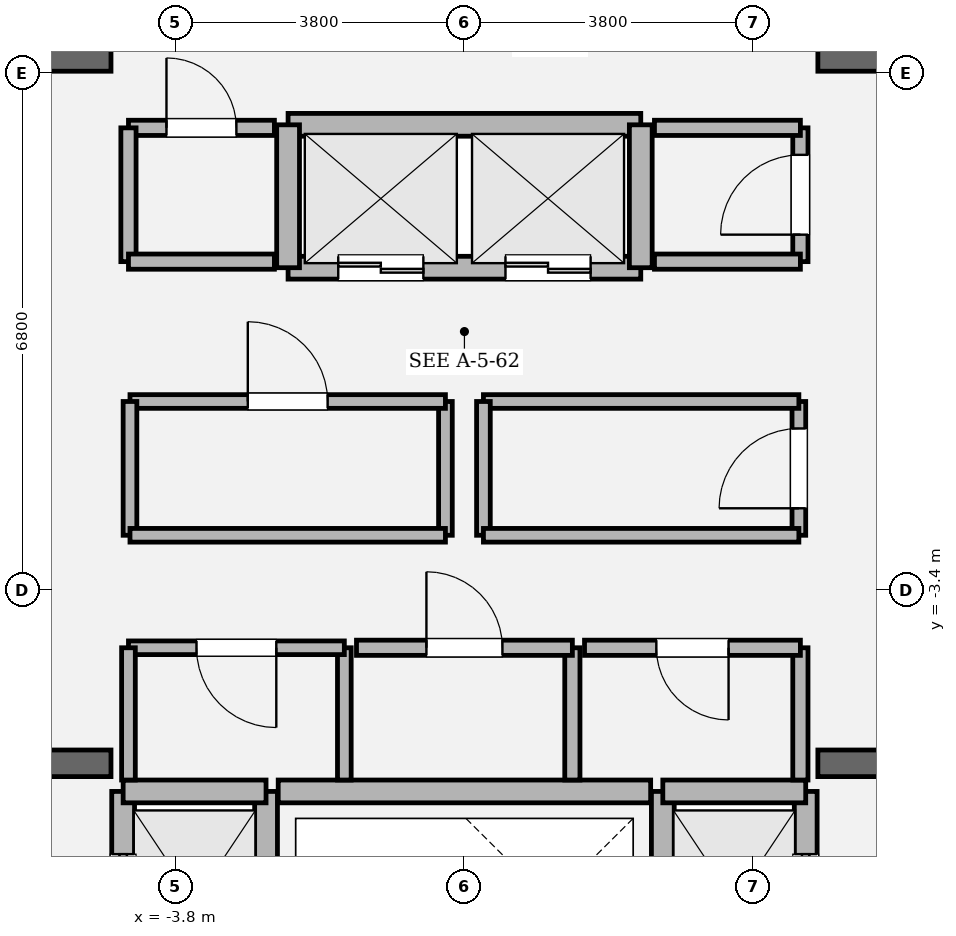
"""IFC4 building model, lengths in metres.
Left out: names, types, materials, properties, quantities, classifications, styles, units other than length and angle.
Written with IfcOpenShell. Run it as: python <this file> out.ifc"""

import sys

from ifc_helpers import new_model, si_unit, direction, frame, frame_2d, origin, place, context, subcontext, project, spatial, rectangle, extrude, element, fill, save


model = new_model("IFC4")
c1 = context("Model", 3, precision=1e-05, world=origin(), true_north=direction((0.0, 1.0)))
c2 = subcontext(c1, "Body", "Model", "MODEL_VIEW")
j1 = project(units=[si_unit("LENGTHUNIT", "METRE"), si_unit("PLANEANGLEUNIT", "RADIAN")], contexts=[c1])
p1 = place(None, origin())
s1 = spatial("IfcSite", under=j1, at=p1, CompositionType="ELEMENT")
p2 = place(p1, origin())
s2 = spatial("IfcBuilding", under=s1, at=p2, CompositionType="ELEMENT")
p3 = place(p2, frame((0.0, 0.0, 300.6)))
s3 = spatial("IfcBuildingStorey", under=s2, at=p3, CompositionType="ELEMENT", Elevation=300.6)
p4 = place(p3, frame((-9.925, -5.68, 0.0), z_axis=(0.0, 0.0, 1.0), x_axis=(1.0, 0.0, 0.0)))
e1 = element("IfcWall", 1, at=p4, inside=s3, PredefinedType="SOLIDWALL", context=c2, shape_type="SweptSolid", body=[
    extrude(rectangle(XDim=5.275, YDim=0.35, at=frame_2d((2.638, 0.0))), origin(), (0.0, 0.0, 1.0), 4.2),
])
p5 = place(p4, frame((1.385, 0.0, 0.0)))
e2 = element("IfcOpeningElement", 2, at=p5, cuts=e1, PredefinedType="OPENING", context=c2, shape_type="SweptSolid", body=[
    extrude(rectangle(XDim=1.18, YDim=2.2, at=frame_2d((0.59, 1.1))), frame((0.0, 0.185, 0.0), z_axis=(0.0, -1.0, 0.0), x_axis=(1.0, 0.0, 0.0)), (0.0, 0.0, 1.0), 0.37),
])
p6 = place(p3, frame((4.65, -5.68, 0.0), z_axis=(0.0, 0.0, 1.0), x_axis=(1.0, 0.0, 0.0)))
e3 = element("IfcWall", 3, at=p6, inside=s3, PredefinedType="SOLIDWALL", context=c2, shape_type="SweptSolid", body=[
    extrude(rectangle(XDim=5.275, YDim=0.35, at=frame_2d((2.638, 0.0))), origin(), (0.0, 0.0, 1.0), 4.2),
])
p7 = place(p6, frame((2.71, 0.0, 0.0)))
e4 = element("IfcOpeningElement", 4, at=p7, cuts=e3, PredefinedType="OPENING", context=c2, shape_type="SweptSolid", body=[
    extrude(rectangle(XDim=1.18, YDim=2.2, at=frame_2d((0.59, 1.1))), frame((0.0, 0.185, 0.0), z_axis=(0.0, -1.0, 0.0), x_axis=(1.0, 0.0, 0.0)), (0.0, 0.0, 1.0), 0.37),
])
for number, where, z_axis, x_axis in (
    (5, (-9.925, 3.6, 0.0), (0.0, 0.0, 1.0), (1.0, 0.0, 0.0)),
    (6, (4.65, 3.6, 0.0), (0.0, 0.0, 1.0), (1.0, 0.0, 0.0)),
):
    element("IfcWall", number, at=place(p3, frame(where, z_axis=z_axis, x_axis=x_axis)), inside=s3, PredefinedType="SOLIDWALL", context=c2, shape_type="SweptSolid", body=[
        extrude(rectangle(XDim=5.275, YDim=0.35, at=frame_2d((2.638, 0.0))), origin(), (0.0, 0.0, 1.0), 4.2),
    ])
p8 = place(p3, frame((-4.49, -8.82, 0.0), z_axis=(0.0, 0.0, 1.0), x_axis=(0.0, 1.0, 0.0)))
e7 = element("IfcWall", 7, at=p8, inside=s3, PredefinedType="SOLIDWALL", context=c2, shape_type="SweptSolid", body=[
    extrude(rectangle(XDim=2.77, YDim=0.3, at=frame_2d((1.385, 0.0))), origin(), (0.0, 0.0, 1.0), 4.0),
])
p9 = place(p8, frame((0.825, 0.0, 0.0)))
e8 = element("IfcOpeningElement", 8, at=p9, cuts=e7, PredefinedType="OPENING", context=c2, shape_type="SweptSolid", body=[
    extrude(rectangle(XDim=1.12, YDim=2.25, at=frame_2d((0.56, 1.125))), frame((0.0, 0.16, 0.0), z_axis=(0.0, -1.0, 0.0), x_axis=(1.0, 0.0, 0.0)), (0.0, 0.0, 1.0), 0.32),
])
p10 = place(p3, frame((-2.61, -8.82, 0.0), z_axis=(0.0, 0.0, 1.0), x_axis=(0.0, 1.0, 0.0)))
e9 = element("IfcWall", 9, at=p10, inside=s3, PredefinedType="SOLIDWALL", context=c2, shape_type="SweptSolid", body=[
    extrude(rectangle(XDim=2.77, YDim=0.3, at=frame_2d((1.385, 0.0))), origin(), (0.0, 0.0, 1.0), 4.0),
])
p11 = place(p3, frame((-4.49, -6.05, 0.0), z_axis=(0.0, 0.0, 1.0), x_axis=(1.0, 0.0, 0.0)))
e10 = element("IfcWall", 10, at=p11, inside=s3, PredefinedType="SOLIDWALL", context=c2, shape_type="SweptSolid", body=[
    extrude(rectangle(XDim=1.88, YDim=0.3, at=frame_2d((0.94, 0.0))), origin(), (0.0, 0.0, 1.0), 4.0),
])
p12 = place(p3, frame((4.49, -8.82, 0.0), z_axis=(0.0, 0.0, 1.0), x_axis=(0.0, 1.0, 0.0)))
e11 = element("IfcWall", 11, at=p12, inside=s3, PredefinedType="SOLIDWALL", context=c2, shape_type="SweptSolid", body=[
    extrude(rectangle(XDim=2.77, YDim=0.3, at=frame_2d((1.385, 0.0))), origin(), (0.0, 0.0, 1.0), 4.0),
])
p13 = place(p12, frame((0.825, 0.0, 0.0)))
e12 = element("IfcOpeningElement", 12, at=p13, cuts=e11, PredefinedType="OPENING", context=c2, shape_type="SweptSolid", body=[
    extrude(rectangle(XDim=1.12, YDim=2.25, at=frame_2d((0.56, 1.125))), frame((0.0, 0.16, 0.0), z_axis=(0.0, -1.0, 0.0), x_axis=(1.0, 0.0, 0.0)), (0.0, 0.0, 1.0), 0.32),
])
p14 = place(p3, frame((2.61, -8.82, 0.0), z_axis=(0.0, 0.0, 1.0), x_axis=(0.0, 1.0, 0.0)))
e13 = element("IfcWall", 13, at=p14, inside=s3, PredefinedType="SOLIDWALL", context=c2, shape_type="SweptSolid", body=[
    extrude(rectangle(XDim=2.77, YDim=0.3, at=frame_2d((1.385, 0.0))), origin(), (0.0, 0.0, 1.0), 4.0),
])
p15 = place(p3, frame((2.61, -6.05, 0.0), z_axis=(0.0, 0.0, 1.0), x_axis=(1.0, 0.0, 0.0)))
e14 = element("IfcWall", 14, at=p15, inside=s3, PredefinedType="SOLIDWALL", context=c2, shape_type="SweptSolid", body=[
    extrude(rectangle(XDim=1.88, YDim=0.3, at=frame_2d((0.94, 0.0))), origin(), (0.0, 0.0, 1.0), 4.0),
])
p16 = place(p3, frame((-2.32, 0.84, 0.0), z_axis=(0.0, 0.0, 1.0), x_axis=(1.0, 0.0, 0.0)))
e15 = element("IfcWall", 15, at=p16, inside=s3, PredefinedType="SOLIDWALL", context=c2, shape_type="SweptSolid", body=[
    extrude(rectangle(XDim=4.64, YDim=0.3, at=frame_2d((2.32, 0.0))), origin(), (0.0, 0.0, 1.0), 4.0),
])
p17 = place(p16, frame((0.66, 0.0, 0.0)))
e16 = element("IfcOpeningElement", 16, at=p17, cuts=e15, PredefinedType="OPENING", context=c2, shape_type="SweptSolid", body=[
    extrude(rectangle(XDim=1.12, YDim=2.25, at=frame_2d((0.56, 1.125))), frame((0.0, 0.16, 0.0), z_axis=(0.0, -1.0, 0.0), x_axis=(1.0, 0.0, 0.0)), (0.0, 0.0, 1.0), 0.32),
])
p18 = place(p16, frame((2.86, 0.0, 0.0)))
e17 = element("IfcOpeningElement", 17, at=p18, cuts=e15, PredefinedType="OPENING", context=c2, shape_type="SweptSolid", body=[
    extrude(rectangle(XDim=1.12, YDim=2.25, at=frame_2d((0.56, 1.125))), frame((0.0, 0.16, 0.0), z_axis=(0.0, -1.0, 0.0), x_axis=(1.0, 0.0, 0.0)), (0.0, 0.0, 1.0), 0.32),
])
p19 = place(p3, frame((-2.32, 2.72, 0.0), z_axis=(0.0, 0.0, 1.0), x_axis=(1.0, 0.0, 0.0)))
e18 = element("IfcWall", 18, at=p19, inside=s3, PredefinedType="SOLIDWALL", context=c2, shape_type="SweptSolid", body=[
    extrude(rectangle(XDim=4.64, YDim=0.3, at=frame_2d((2.32, 0.0))), origin(), (0.0, 0.0, 1.0), 4.0),
])
for number, where, z_axis, x_axis in (
    (19, (-2.32, 0.84, 0.0), (0.0, 0.0, 1.0), (0.0, 1.0, 0.0)),
    (20, (2.32, 0.84, 0.0), (0.0, 0.0, 1.0), (0.0, 1.0, 0.0)),
):
    element("IfcWall", number, at=place(p3, frame(where, z_axis=z_axis, x_axis=x_axis)), inside=s3, PredefinedType="SOLIDWALL", context=c2, shape_type="SweptSolid", body=[
        extrude(rectangle(XDim=1.88, YDim=0.3, at=frame_2d((0.94, 0.0))), origin(), (0.0, 0.0, 1.0), 4.0),
    ])
p20 = place(p3, frame((-2.45, -6.05, 0.0), z_axis=(0.0, 0.0, 1.0), x_axis=(1.0, 0.0, 0.0)))
e21 = element("IfcWall", 21, at=p20, inside=s3, PredefinedType="SOLIDWALL", context=c2, shape_type="SweptSolid", body=[
    extrude(rectangle(XDim=4.9, YDim=0.3, at=frame_2d((2.45, 0.0))), origin(), (0.0, 0.0, 1.0), 4.0),
])
p21 = place(p3, frame((-1.58, -5.9, 0.0), z_axis=(0.0, 0.0, 1.0), x_axis=(0.0, 1.0, 0.0)))
e22 = element("IfcWall", 22, at=p21, inside=s3, PredefinedType="PARTITIONING", context=c2, shape_type="SweptSolid", body=[
    extrude(rectangle(XDim=1.74, YDim=0.18, at=frame_2d((0.87, 0.0))), origin(), (0.0, 0.0, 1.0), 4.0),
])
p22 = place(p3, frame((-1.58, -4.16, 0.0), z_axis=(0.0, 0.0, 1.0), x_axis=(-1.0, 0.0, 0.0)))
e23 = element("IfcWall", 23, at=p22, inside=s3, PredefinedType="PARTITIONING", context=c2, shape_type="SweptSolid", body=[
    extrude(rectangle(XDim=2.84, YDim=0.18, at=frame_2d((1.42, 0.0))), origin(), (0.0, 0.0, 1.0), 4.0),
])
p23 = place(p22, frame((0.895, 0.0, 0.0)))
e24 = element("IfcOpeningElement", 24, at=p23, cuts=e23, PredefinedType="OPENING", context=c2, shape_type="SweptSolid", body=[
    extrude(rectangle(XDim=1.05, YDim=2.2, at=frame_2d((0.525, 1.1))), frame((0.0, 0.1, 0.0), z_axis=(0.0, -1.0, 0.0), x_axis=(1.0, 0.0, 0.0)), (0.0, 0.0, 1.0), 0.2),
])
p24 = place(p3, frame((-4.42, -4.16, 0.0), z_axis=(0.0, 0.0, 1.0), x_axis=(0.0, -1.0, 0.0)))
e25 = element("IfcWall", 25, at=p24, inside=s3, PredefinedType="PARTITIONING", context=c2, shape_type="SweptSolid", body=[
    extrude(rectangle(XDim=1.74, YDim=0.18, at=frame_2d((0.87, 0.0))), origin(), (0.0, 0.0, 1.0), 4.0),
])
p25 = place(p3, frame((1.42, -5.9, 0.0), z_axis=(0.0, 0.0, 1.0), x_axis=(0.0, 1.0, 0.0)))
e26 = element("IfcWall", 26, at=p25, inside=s3, PredefinedType="SOLIDWALL", context=c2, shape_type="SweptSolid", body=[
    extrude(rectangle(XDim=1.74, YDim=0.2, at=frame_2d((0.87, 0.0))), origin(), (0.0, 0.0, 1.0), 4.0),
])
p26 = place(p3, frame((1.42, -4.16, 0.0), z_axis=(0.0, 0.0, 1.0), x_axis=(-1.0, 0.0, 0.0)))
e27 = element("IfcWall", 27, at=p26, inside=s3, PredefinedType="SOLIDWALL", context=c2, shape_type="SweptSolid", body=[
    extrude(rectangle(XDim=2.84, YDim=0.2, at=frame_2d((1.42, 0.0))), origin(), (0.0, 0.0, 1.0), 4.0),
])
p27 = place(p26, frame((0.92, 0.0, 0.0)))
e28 = element("IfcOpeningElement", 28, at=p27, cuts=e27, PredefinedType="OPENING", context=c2, shape_type="SweptSolid", body=[
    extrude(rectangle(XDim=1.0, YDim=2.15, at=frame_2d((0.5, 1.075))), frame((0.0, 0.11, 0.0), z_axis=(0.0, -1.0, 0.0), x_axis=(1.0, 0.0, 0.0)), (0.0, 0.0, 1.0), 0.22),
])
p28 = place(p3, frame((4.42, -5.9, 0.0), z_axis=(0.0, 0.0, 1.0), x_axis=(0.0, 1.0, 0.0)))
e29 = element("IfcWall", 29, at=p28, inside=s3, PredefinedType="SOLIDWALL", context=c2, shape_type="SweptSolid", body=[
    extrude(rectangle(XDim=1.74, YDim=0.2, at=frame_2d((0.87, 0.0))), origin(), (0.0, 0.0, 1.0), 4.0),
])
p29 = place(p3, frame((4.42, -4.16, 0.0), z_axis=(0.0, 0.0, 1.0), x_axis=(-1.0, 0.0, 0.0)))
e30 = element("IfcWall", 30, at=p29, inside=s3, PredefinedType="SOLIDWALL", context=c2, shape_type="SweptSolid", body=[
    extrude(rectangle(XDim=2.84, YDim=0.2, at=frame_2d((1.42, 0.0))), origin(), (0.0, 0.0, 1.0), 4.0),
])
p30 = place(p29, frame((0.945, 0.0, 0.0)))
e31 = element("IfcOpeningElement", 31, at=p30, cuts=e30, PredefinedType="OPENING", context=c2, shape_type="SweptSolid", body=[
    extrude(rectangle(XDim=0.95, YDim=2.15, at=frame_2d((0.475, 1.075))), frame((0.0, 0.11, 0.0), z_axis=(0.0, -1.0, 0.0), x_axis=(1.0, 0.0, 0.0)), (0.0, 0.0, 1.0), 0.22),
])
p31 = place(p3, frame((-0.25, -2.68, 0.0), z_axis=(0.0, 0.0, 1.0), x_axis=(0.0, 1.0, 0.0)))
e32 = element("IfcWall", 32, at=p31, inside=s3, PredefinedType="PARTITIONING", context=c2, shape_type="SweptSolid", body=[
    extrude(rectangle(XDim=1.76, YDim=0.18, at=frame_2d((0.88, 0.0))), origin(), (0.0, 0.0, 1.0), 4.0),
])
p32 = place(p3, frame((-0.25, -0.92, 0.0), z_axis=(0.0, 0.0, 1.0), x_axis=(-1.0, 0.0, 0.0)))
e33 = element("IfcWall", 33, at=p32, inside=s3, PredefinedType="PARTITIONING", context=c2, shape_type="SweptSolid", body=[
    extrude(rectangle(XDim=4.15, YDim=0.18, at=frame_2d((2.075, 0.0))), origin(), (0.0, 0.0, 1.0), 4.0),
])
p33 = place(p32, frame((1.55, 0.0, 0.0)))
e34 = element("IfcOpeningElement", 34, at=p33, cuts=e33, PredefinedType="OPENING", context=c2, shape_type="SweptSolid", body=[
    extrude(rectangle(XDim=1.05, YDim=2.2, at=frame_2d((0.525, 1.1))), frame((0.0, 0.1, 0.0), z_axis=(0.0, -1.0, 0.0), x_axis=(1.0, 0.0, 0.0)), (0.0, 0.0, 1.0), 0.2),
])
p34 = place(p3, frame((-4.4, -0.92, 0.0), z_axis=(0.0, 0.0, 1.0), x_axis=(0.0, -1.0, 0.0)))
e35 = element("IfcWall", 35, at=p34, inside=s3, PredefinedType="PARTITIONING", context=c2, shape_type="SweptSolid", body=[
    extrude(rectangle(XDim=1.76, YDim=0.18, at=frame_2d((0.88, 0.0))), origin(), (0.0, 0.0, 1.0), 4.0),
])
p35 = place(p3, frame((-4.4, -2.68, 0.0), z_axis=(0.0, 0.0, 1.0), x_axis=(1.0, 0.0, 0.0)))
e36 = element("IfcWall", 36, at=p35, inside=s3, PredefinedType="PARTITIONING", context=c2, shape_type="SweptSolid", body=[
    extrude(rectangle(XDim=4.15, YDim=0.18, at=frame_2d((2.075, 0.0))), origin(), (0.0, 0.0, 1.0), 4.0),
])
p36 = place(p3, frame((4.4, -2.68, 0.0), z_axis=(0.0, 0.0, 1.0), x_axis=(0.0, 1.0, 0.0)))
e37 = element("IfcWall", 37, at=p36, inside=s3, PredefinedType="PARTITIONING", context=c2, shape_type="SweptSolid", body=[
    extrude(rectangle(XDim=1.76, YDim=0.18, at=frame_2d((0.88, 0.0))), origin(), (0.0, 0.0, 1.0), 4.0),
])
p37 = place(p36, frame((0.355, 0.0, 0.0)))
e38 = element("IfcOpeningElement", 38, at=p37, cuts=e37, PredefinedType="OPENING", context=c2, shape_type="SweptSolid", body=[
    extrude(rectangle(XDim=1.05, YDim=2.2, at=frame_2d((0.525, 1.1))), frame((0.0, 0.1, 0.0), z_axis=(0.0, -1.0, 0.0), x_axis=(1.0, 0.0, 0.0)), (0.0, 0.0, 1.0), 0.2),
])
p38 = place(p3, frame((4.4, -0.92, 0.0), z_axis=(0.0, 0.0, 1.0), x_axis=(-1.0, 0.0, 0.0)))
e39 = element("IfcWall", 39, at=p38, inside=s3, PredefinedType="PARTITIONING", context=c2, shape_type="SweptSolid", body=[
    extrude(rectangle(XDim=4.15, YDim=0.18, at=frame_2d((2.075, 0.0))), origin(), (0.0, 0.0, 1.0), 4.0),
])
p39 = place(p3, frame((0.25, -0.92, 0.0), z_axis=(0.0, 0.0, 1.0), x_axis=(0.0, -1.0, 0.0)))
e40 = element("IfcWall", 40, at=p39, inside=s3, PredefinedType="PARTITIONING", context=c2, shape_type="SweptSolid", body=[
    extrude(rectangle(XDim=1.76, YDim=0.18, at=frame_2d((0.88, 0.0))), origin(), (0.0, 0.0, 1.0), 4.0),
])
p40 = place(p3, frame((0.25, -2.68, 0.0), z_axis=(0.0, 0.0, 1.0), x_axis=(1.0, 0.0, 0.0)))
e41 = element("IfcWall", 41, at=p40, inside=s3, PredefinedType="PARTITIONING", context=c2, shape_type="SweptSolid", body=[
    extrude(rectangle(XDim=4.15, YDim=0.18, at=frame_2d((2.075, 0.0))), origin(), (0.0, 0.0, 1.0), 4.0),
])
p41 = place(p3, frame((-2.5, 2.68, 0.0), z_axis=(0.0, 0.0, 1.0), x_axis=(-1.0, 0.0, 0.0)))
e42 = element("IfcWall", 42, at=p41, inside=s3, PredefinedType="SOLIDWALL", context=c2, shape_type="SweptSolid", body=[
    extrude(rectangle(XDim=1.92, YDim=0.2, at=frame_2d((0.96, 0.0))), origin(), (0.0, 0.0, 1.0), 4.0),
])
p42 = place(p41, frame((0.5, 0.0, 0.0)))
e43 = element("IfcOpeningElement", 43, at=p42, cuts=e42, PredefinedType="OPENING", context=c2, shape_type="SweptSolid", body=[
    extrude(rectangle(XDim=0.92, YDim=2.1, at=frame_2d((0.46, 1.05))), frame((0.0, 0.11, 0.0), z_axis=(0.0, -1.0, 0.0), x_axis=(1.0, 0.0, 0.0)), (0.0, 0.0, 1.0), 0.22),
])
p43 = place(p3, frame((-4.42, 2.68, 0.0), z_axis=(0.0, 0.0, 1.0), x_axis=(0.0, -1.0, 0.0)))
e44 = element("IfcWall", 44, at=p43, inside=s3, PredefinedType="SOLIDWALL", context=c2, shape_type="SweptSolid", body=[
    extrude(rectangle(XDim=1.76, YDim=0.2, at=frame_2d((0.88, 0.0))), origin(), (0.0, 0.0, 1.0), 4.0),
])
p44 = place(p3, frame((-4.42, 0.92, 0.0), z_axis=(0.0, 0.0, 1.0), x_axis=(1.0, 0.0, 0.0)))
e45 = element("IfcWall", 45, at=p44, inside=s3, PredefinedType="SOLIDWALL", context=c2, shape_type="SweptSolid", body=[
    extrude(rectangle(XDim=1.92, YDim=0.2, at=frame_2d((0.96, 0.0))), origin(), (0.0, 0.0, 1.0), 4.0),
])
p45 = place(p3, frame((4.42, 0.92, 0.0), z_axis=(0.0, 0.0, 1.0), x_axis=(0.0, 1.0, 0.0)))
e46 = element("IfcWall", 46, at=p45, inside=s3, PredefinedType="SOLIDWALL", context=c2, shape_type="SweptSolid", body=[
    extrude(rectangle(XDim=1.76, YDim=0.2, at=frame_2d((0.88, 0.0))), origin(), (0.0, 0.0, 1.0), 4.0),
])
p46 = place(p45, frame((0.355, 0.0, 0.0)))
e47 = element("IfcOpeningElement", 47, at=p46, cuts=e46, PredefinedType="OPENING", context=c2, shape_type="SweptSolid", body=[
    extrude(rectangle(XDim=1.05, YDim=2.2, at=frame_2d((0.525, 1.1))), frame((0.0, 0.11, 0.0), z_axis=(0.0, -1.0, 0.0), x_axis=(1.0, 0.0, 0.0)), (0.0, 0.0, 1.0), 0.22),
])
for number, where, z_axis, x_axis in (
    (48, (4.42, 2.68, 0.0), (0.0, 0.0, 1.0), (-1.0, 0.0, 0.0)),
    (49, (2.5, 0.92, 0.0), (0.0, 0.0, 1.0), (1.0, 0.0, 0.0)),
):
    element("IfcWall", number, at=place(p3, frame(where, z_axis=z_axis, x_axis=x_axis)), inside=s3, PredefinedType="SOLIDWALL", context=c2, shape_type="SweptSolid", body=[
        extrude(rectangle(XDim=1.92, YDim=0.2, at=frame_2d((0.96, 0.0))), origin(), (0.0, 0.0, 1.0), 4.0),
    ])
p47 = place(p9, origin())
e50 = element("IfcDoor", 50, at=p47, inside=s3, OperationType="SLIDING_TO_LEFT", PredefinedType="DOOR", context=c2, shape_type="SweptSolid", body=[
    extrude(rectangle(XDim=1.12, YDim=2.25, at=frame_2d((0.56, 1.125))), frame((0.0, 0.025, 0.0), z_axis=(0.0, -1.0, 0.0), x_axis=(1.0, 0.0, 0.0)), (0.0, 0.0, 1.0), 0.05),
])
fill(e8, e50)
p48 = place(p13, origin())
e51 = element("IfcDoor", 51, at=p48, inside=s3, OperationType="SLIDING_TO_RIGHT", PredefinedType="DOOR", context=c2, shape_type="SweptSolid", body=[
    extrude(rectangle(XDim=1.12, YDim=2.25, at=frame_2d((0.56, 1.125))), frame((0.0, 0.025, 0.0), z_axis=(0.0, -1.0, 0.0), x_axis=(1.0, 0.0, 0.0)), (0.0, 0.0, 1.0), 0.05),
])
fill(e12, e51)
p49 = place(p17, origin())
e52 = element("IfcDoor", 52, at=p49, inside=s3, OperationType="DOUBLE_DOOR_SLIDING", PredefinedType="DOOR", context=c2, shape_type="SweptSolid", body=[
    extrude(rectangle(XDim=1.12, YDim=2.25, at=frame_2d((0.56, 1.125))), frame((0.0, 0.025, 0.0), z_axis=(0.0, -1.0, 0.0), x_axis=(1.0, 0.0, 0.0)), (0.0, 0.0, 1.0), 0.05),
])
fill(e16, e52)
p50 = place(p18, origin())
e53 = element("IfcDoor", 53, at=p50, inside=s3, OperationType="DOUBLE_DOOR_SLIDING", PredefinedType="DOOR", context=c2, shape_type="SweptSolid", body=[
    extrude(rectangle(XDim=1.12, YDim=2.25, at=frame_2d((0.56, 1.125))), frame((0.0, 0.025, 0.0), z_axis=(0.0, -1.0, 0.0), x_axis=(1.0, 0.0, 0.0)), (0.0, 0.0, 1.0), 0.05),
])
fill(e17, e53)
p51 = place(p23, origin())
e54 = element("IfcDoor", 54, at=p51, inside=s3, OperationType="SINGLE_SWING_LEFT", PredefinedType="DOOR", context=c2, shape_type="SweptSolid", body=[
    extrude(rectangle(XDim=1.05, YDim=2.2, at=frame_2d((0.525, 1.1))), frame((0.0, 0.025, 0.0), z_axis=(0.0, -1.0, 0.0), x_axis=(1.0, 0.0, 0.0)), (0.0, 0.0, 1.0), 0.05),
])
fill(e24, e54)
p52 = place(p27, origin())
e55 = element("IfcDoor", 55, at=p52, inside=s3, OperationType="SINGLE_SWING_RIGHT", PredefinedType="DOOR", context=c2, shape_type="SweptSolid", body=[
    extrude(rectangle(XDim=1.0, YDim=2.15, at=frame_2d((0.5, 1.075))), frame((0.0, 0.025, 0.0), z_axis=(0.0, -1.0, 0.0), x_axis=(1.0, 0.0, 0.0)), (0.0, 0.0, 1.0), 0.05),
])
fill(e28, e55)
p53 = place(p30, origin())
e56 = element("IfcDoor", 56, at=p53, inside=s3, OperationType="SINGLE_SWING_LEFT", PredefinedType="DOOR", context=c2, shape_type="SweptSolid", body=[
    extrude(rectangle(XDim=0.95, YDim=2.15, at=frame_2d((0.475, 1.075))), frame((0.0, 0.025, 0.0), z_axis=(0.0, -1.0, 0.0), x_axis=(1.0, 0.0, 0.0)), (0.0, 0.0, 1.0), 0.05),
])
fill(e31, e56)
p54 = place(p33, origin())
e57 = element("IfcDoor", 57, at=p54, inside=s3, OperationType="SINGLE_SWING_RIGHT", PredefinedType="DOOR", context=c2, shape_type="SweptSolid", body=[
    extrude(rectangle(XDim=1.05, YDim=2.2, at=frame_2d((0.525, 1.1))), frame((0.0, 0.025, 0.0), z_axis=(0.0, -1.0, 0.0), x_axis=(1.0, 0.0, 0.0)), (0.0, 0.0, 1.0), 0.05),
])
fill(e34, e57)
p55 = place(p37, origin())
e58 = element("IfcDoor", 58, at=p55, inside=s3, OperationType="SINGLE_SWING_LEFT", PredefinedType="DOOR", context=c2, shape_type="SweptSolid", body=[
    extrude(rectangle(XDim=1.05, YDim=2.2, at=frame_2d((0.525, 1.1))), frame((0.0, 0.025, 0.0), z_axis=(0.0, -1.0, 0.0), x_axis=(1.0, 0.0, 0.0)), (0.0, 0.0, 1.0), 0.05),
])
fill(e38, e58)
p56 = place(p42, origin())
e59 = element("IfcDoor", 59, at=p56, inside=s3, OperationType="SINGLE_SWING_RIGHT", PredefinedType="DOOR", context=c2, shape_type="SweptSolid", body=[
    extrude(rectangle(XDim=0.92, YDim=2.1, at=frame_2d((0.46, 1.05))), frame((0.0, 0.025, 0.0), z_axis=(0.0, -1.0, 0.0), x_axis=(1.0, 0.0, 0.0)), (0.0, 0.0, 1.0), 0.05),
])
fill(e43, e59)
p57 = place(p46, origin())
e60 = element("IfcDoor", 60, at=p57, inside=s3, OperationType="SINGLE_SWING_LEFT", PredefinedType="DOOR", context=c2, shape_type="SweptSolid", body=[
    extrude(rectangle(XDim=1.05, YDim=2.2, at=frame_2d((0.525, 1.1))), frame((0.0, 0.025, 0.0), z_axis=(0.0, -1.0, 0.0), x_axis=(1.0, 0.0, 0.0)), (0.0, 0.0, 1.0), 0.05),
])
fill(e47, e60)
save(model, sys.argv[1])
